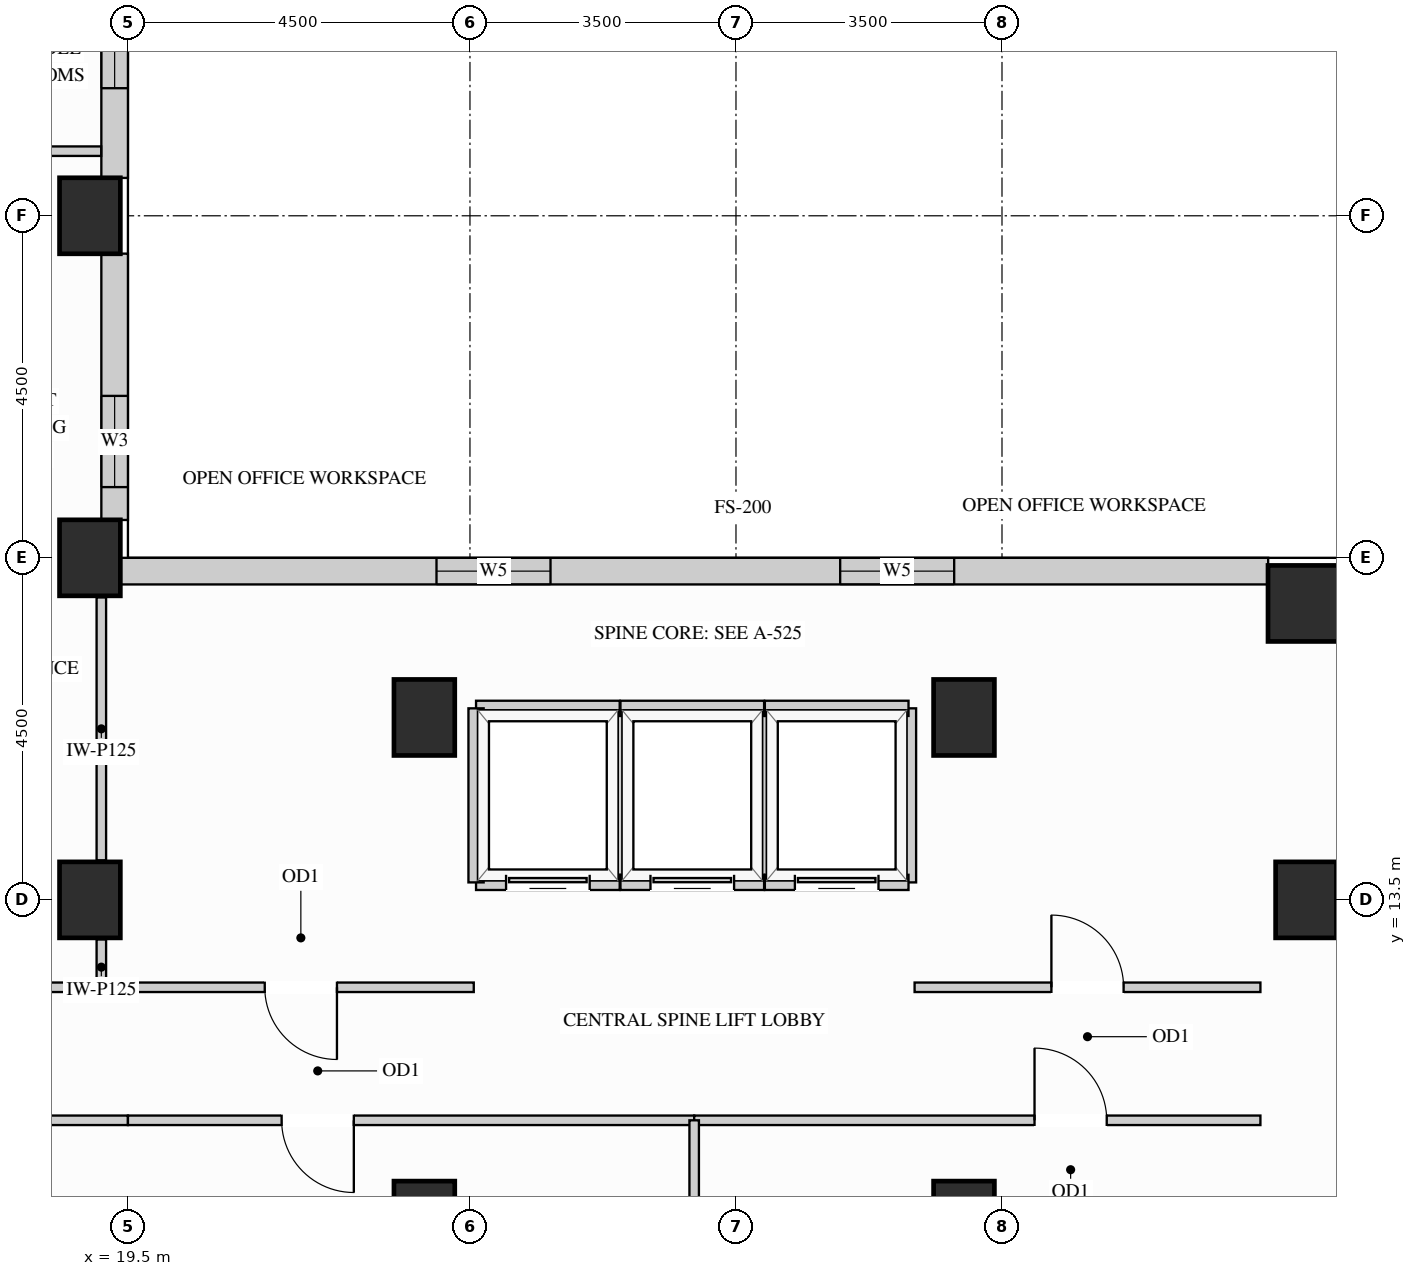
"""IFC4 building model, lengths in metres.
Left out: names, types, materials, properties, quantities, classifications, styles, units other than length and angle.
Written with IfcOpenShell. Run it as: python <this file> out.ifc"""

import sys

from ifc_helpers import new_model, si_unit, direction, frame, frame_2d, origin, origin_2d, place, context, subcontext, project, spatial, rectangle, extrude, source, transform, mapped, element, fill, save


model = new_model("IFC4")
c1 = context("Model", 3, precision=1e-05, world=origin(), true_north=direction((0.0, 1.0)))
c2 = subcontext(c1, "Body", "Model", "MODEL_VIEW")
j1 = project(units=[si_unit("LENGTHUNIT", "METRE"), si_unit("PLANEANGLEUNIT", "RADIAN")], contexts=[c1])
p1 = place(None, origin())
s1 = spatial("IfcSite", under=j1, at=p1, CompositionType="ELEMENT")
p2 = place(p1, origin())
s2 = spatial("IfcBuilding", under=s1, at=p2, CompositionType="ELEMENT")
p3 = place(p2, frame((0.0, 0.0, 171.9)))
s3 = spatial("IfcBuildingStorey", under=s2, at=p3, CompositionType="ELEMENT", Elevation=171.9)
m1 = source(origin(), c2, "Body", "SweptSolid", [
    extrude(rectangle(XDim=0.8, YDim=1.0, at=origin_2d()), origin(), (0.0, 0.0, 1.0), 3.4),
])
for number, where, z_axis, x_axis in (
    (1, (19.0, 13.5, 0.0), (0.0, 0.0, 1.0), (1.0, 0.0, 0.0)),
    (2, (19.0, 18.0, 0.0), (0.0, 0.0, 1.0), (1.0, 0.0, 0.0)),
    (3, (19.0, 22.5, 0.0), (0.0, 0.0, 1.0), (1.0, 0.0, 0.0)),
    (4, (35.0, 13.5, 0.0), (0.0, 0.0, 1.0), (1.0, 0.0, 0.0)),
    (5, (23.4, 15.9, 0.0), (0.0, 0.0, 1.0), (1.0, 0.0, 0.0)),
    (6, (23.4, 9.3, 0.0), (0.0, 0.0, 1.0), (1.0, 0.0, 0.0)),
    (7, (30.5, 15.9, 0.0), (0.0, 0.0, 1.0), (1.0, 0.0, 0.0)),
    (8, (30.5, 9.3, 0.0), (0.0, 0.0, 1.0), (1.0, 0.0, 0.0)),
):
    element("IfcColumn", number, at=place(p3, frame(where, z_axis=z_axis, x_axis=x_axis)), inside=s3, PredefinedType="COLUMN", context=c2, shape_type="MappedRepresentation", body=[
        mapped(m1, transform((0.0, 0.0, 0.0), x_axis=(1.0, 0.0, 0.0), y_axis=(0.0, 1.0, 0.0), z_axis=(0.0, 0.0, 1.0))),
    ])
m2 = source(origin(), c2, "Body", "SweptSolid", [
    extrude(rectangle(XDim=1.0, YDim=1.0, at=origin_2d()), origin(), (0.0, 0.0, 1.0), 3.4),
])
p4 = place(p3, frame((35.0, 17.4, 0.0), z_axis=(0.0, 0.0, 1.0), x_axis=(1.0, 0.0, 0.0)))
e9 = element("IfcColumn", 9, at=p4, inside=s3, PredefinedType="COLUMN", context=c2, shape_type="MappedRepresentation", body=[
    mapped(m2, transform((0.0, 0.0, 0.0), x_axis=(1.0, 0.0, 0.0), y_axis=(0.0, 1.0, 0.0), z_axis=(0.0, 0.0, 1.0))),
])
p5 = place(p3, frame((34.502, 17.825, 0.0), z_axis=(0.0, 0.0, 1.0), x_axis=(-1.0, 0.0, 0.0)))
e10 = element("IfcWall", 10, at=p5, inside=s3, PredefinedType="SOLIDWALL", context=c2, shape_type="SweptSolid", body=[
    extrude(rectangle(XDim=15.104, YDim=0.35, at=frame_2d((7.552, 0.0))), origin(), (0.0, 0.0, 1.0), 3.385),
])
p6 = place(p5, frame((4.131, 0.0, 0.78)))
e11 = element("IfcOpeningElement", 11, at=p6, cuts=e10, PredefinedType="OPENING", context=c2, shape_type="SweptSolid", body=[
    extrude(rectangle(XDim=1.5, YDim=2.0, at=frame_2d((0.75, 1.0))), frame((0.0, 0.185, 0.0), z_axis=(0.0, -1.0, 0.0), x_axis=(1.0, 0.0, 0.0)), (0.0, 0.0, 1.0), 0.37),
])
p7 = place(p5, frame((9.442, 0.0, 0.78)))
e12 = element("IfcOpeningElement", 12, at=p7, cuts=e10, PredefinedType="OPENING", context=c2, shape_type="SweptSolid", body=[
    extrude(rectangle(XDim=1.5, YDim=2.0, at=frame_2d((0.75, 1.0))), frame((0.0, 0.185, 0.0), z_axis=(0.0, -1.0, 0.0), x_axis=(1.0, 0.0, 0.0)), (0.0, 0.0, 1.0), 0.37),
])
p8 = place(p3, frame((19.325, 18.498, 0.0), z_axis=(0.0, 0.0, 1.0), x_axis=(0.0, 1.0, 0.0)))
e13 = element("IfcWall", 13, at=p8, inside=s3, PredefinedType="SOLIDWALL", context=c2, shape_type="SweptSolid", body=[
    extrude(rectangle(XDim=3.504, YDim=0.35, at=frame_2d((1.752, 0.0))), origin(), (0.0, 0.0, 1.0), 2.612),
])
p9 = place(p8, frame((0.433, 0.0, 0.78)))
e14 = element("IfcOpeningElement", 14, at=p9, cuts=e13, PredefinedType="OPENING", context=c2, shape_type="SweptSolid", body=[
    extrude(rectangle(XDim=1.2, YDim=1.652, at=frame_2d((0.6, 0.826))), frame((0.0, 0.185, 0.0), z_axis=(0.0, -1.0, 0.0), x_axis=(1.0, 0.0, 0.0)), (0.0, 0.0, 1.0), 0.37),
])
p10 = place(p3, frame((19.325, 22.998, 0.0), z_axis=(0.0, 0.0, 1.0), x_axis=(0.0, 1.0, 0.0)))
e15 = element("IfcWall", 15, at=p10, inside=s3, PredefinedType="SOLIDWALL", context=c2, shape_type="SweptSolid", body=[
    extrude(rectangle(XDim=3.304, YDim=0.35, at=frame_2d((1.652, 0.0))), origin(), (0.0, 0.0, 1.0), 2.612),
])
p11 = place(p10, frame((1.18, 0.0, 0.78)))
e16 = element("IfcOpeningElement", 16, at=p11, cuts=e15, PredefinedType="OPENING", context=c2, shape_type="SweptSolid", body=[
    extrude(rectangle(XDim=1.5, YDim=1.652, at=frame_2d((0.75, 0.826))), frame((0.0, 0.185, 0.0), z_axis=(0.0, -1.0, 0.0), x_axis=(1.0, 0.0, 0.0)), (0.0, 0.0, 1.0), 0.37),
])
m3 = source(origin(), c2, "Body", "SweptSolid", [
    extrude(rectangle(XDim=2.598, YDim=0.125, at=frame_2d((1.299, 0.0))), origin(), (0.0, 0.0, 1.0), 3.385),
])
p12 = place(p3, frame((16.55, 23.35, 0.0), z_axis=(0.0, 0.0, 1.0), x_axis=(1.0, 0.0, 0.0)))
e17 = element("IfcWall", 17, at=p12, inside=s3, PredefinedType="PARTITIONING", context=c2, shape_type="MappedRepresentation", body=[
    mapped(m3, transform((0.0, 0.0, 0.0), x_axis=(1.0, 0.0, 0.0), y_axis=(0.0, 1.0, 0.0), z_axis=(0.0, 0.0, 1.0))),
])
m4 = source(origin(), c2, "Body", "SweptSolid", [
    extrude(rectangle(XDim=0.63, YDim=0.125, at=frame_2d((0.315, 0.0))), origin(), (0.0, 0.0, 1.0), 2.773),
])
p13 = place(p3, frame((19.15, 12.35, 0.0), z_axis=(0.0, 0.0, 1.0), x_axis=(0.0, 1.0, 0.0)))
e18 = element("IfcWall", 18, at=p13, inside=s3, PredefinedType="PARTITIONING", context=c2, shape_type="MappedRepresentation", body=[
    mapped(m4, transform((0.0, 0.0, 0.0), x_axis=(1.0, 0.0, 0.0), y_axis=(0.0, 1.0, 0.0), z_axis=(0.0, 0.0, 1.0))),
])
m5 = source(origin(), c2, "Body", "SweptSolid", [
    extrude(rectangle(XDim=3.46, YDim=0.125, at=frame_2d((1.73, 0.0))), origin(), (0.0, 0.0, 1.0), 2.773),
])
p14 = place(p3, frame((19.15, 14.02, 0.0), z_axis=(0.0, 0.0, 1.0), x_axis=(0.0, 1.0, 0.0)))
e19 = element("IfcWall", 19, at=p14, inside=s3, PredefinedType="PARTITIONING", context=c2, shape_type="MappedRepresentation", body=[
    mapped(m5, transform((0.0, 0.0, 0.0), x_axis=(1.0, 0.0, 0.0), y_axis=(0.0, 1.0, 0.0), z_axis=(0.0, 0.0, 1.0))),
])
p15 = place(p3, frame((29.85, 12.35, 0.0), z_axis=(0.0, 0.0, 1.0), x_axis=(1.0, 0.0, 0.0)))
e20 = element("IfcWall", 20, at=p15, inside=s3, PredefinedType="PARTITIONING", context=c2, shape_type="SweptSolid", body=[
    extrude(rectangle(XDim=4.55, YDim=0.125, at=frame_2d((2.275, 0.0))), origin(), (0.0, 0.0, 1.0), 3.385),
])
p16 = place(p15, frame((1.8, 0.0, 0.0)))
e21 = element("IfcOpeningElement", 21, at=p16, cuts=e20, PredefinedType="OPENING", context=c2, shape_type="SweptSolid", body=[
    extrude(rectangle(XDim=0.95, YDim=2.15, at=frame_2d((0.475, 1.075))), frame((0.0, 0.073, 0.0), z_axis=(0.0, -1.0, 0.0), x_axis=(1.0, 0.0, 0.0)), (0.0, 0.0, 1.0), 0.145),
])
m6 = source(origin(), c2, "Body", "SweptSolid", [
    extrude(rectangle(XDim=2.95, YDim=0.125, at=frame_2d((1.475, 0.0))), origin(), (0.0, 0.0, 1.0), 3.385),
])
p17 = place(p3, frame((16.55, 12.35, 0.0), z_axis=(0.0, 0.0, 1.0), x_axis=(1.0, 0.0, 0.0)))
e22 = element("IfcWall", 22, at=p17, inside=s3, PredefinedType="PARTITIONING", context=c2, shape_type="MappedRepresentation", body=[
    mapped(m6, transform((0.0, 0.0, 0.0), x_axis=(1.0, 0.0, 0.0), y_axis=(0.0, 1.0, 0.0), z_axis=(0.0, 0.0, 1.0))),
])
p18 = place(p3, frame((19.5, 12.35, 0.0), z_axis=(0.0, 0.0, 1.0), x_axis=(1.0, 0.0, 0.0)))
e23 = element("IfcWall", 23, at=p18, inside=s3, PredefinedType="PARTITIONING", context=c2, shape_type="SweptSolid", body=[
    extrude(rectangle(XDim=4.55, YDim=0.125, at=frame_2d((2.275, 0.0))), origin(), (0.0, 0.0, 1.0), 3.385),
])
p19 = place(p18, frame((1.8, 0.0, 0.0)))
e24 = element("IfcOpeningElement", 24, at=p19, cuts=e23, PredefinedType="OPENING", context=c2, shape_type="SweptSolid", body=[
    extrude(rectangle(XDim=0.95, YDim=2.15, at=frame_2d((0.475, 1.075))), frame((0.0, 0.073, 0.0), z_axis=(0.0, -1.0, 0.0), x_axis=(1.0, 0.0, 0.0)), (0.0, 0.0, 1.0), 0.145),
])
p20 = place(p3, frame((16.55, 10.6, 0.0), z_axis=(0.0, 0.0, 1.0), x_axis=(1.0, 0.0, 0.0)))
e25 = element("IfcWall", 25, at=p20, inside=s3, PredefinedType="PARTITIONING", context=c2, shape_type="MappedRepresentation", body=[
    mapped(m6, transform((0.0, 0.0, 0.0), x_axis=(1.0, 0.0, 0.0), y_axis=(0.0, 1.0, 0.0), z_axis=(0.0, 0.0, 1.0))),
])
p21 = place(p3, frame((19.5, 10.6, 0.0), z_axis=(0.0, 0.0, 1.0), x_axis=(1.0, 0.0, 0.0)))
e26 = element("IfcWall", 26, at=p21, inside=s3, PredefinedType="PARTITIONING", context=c2, shape_type="SweptSolid", body=[
    extrude(rectangle(XDim=7.45, YDim=0.125, at=frame_2d((3.725, 0.0))), origin(), (0.0, 0.0, 1.0), 3.385),
])
p22 = place(p21, frame((2.022, 0.0, 0.0)))
e27 = element("IfcOpeningElement", 27, at=p22, cuts=e26, PredefinedType="OPENING", context=c2, shape_type="SweptSolid", body=[
    extrude(rectangle(XDim=0.95, YDim=2.15, at=frame_2d((0.475, 1.075))), frame((0.0, 0.073, 0.0), z_axis=(0.0, -1.0, 0.0), x_axis=(1.0, 0.0, 0.0)), (0.0, 0.0, 1.0), 0.145),
])
p23 = place(p3, frame((26.95, 10.6, 0.0), z_axis=(0.0, 0.0, 1.0), x_axis=(1.0, 0.0, 0.0)))
e28 = element("IfcWall", 28, at=p23, inside=s3, PredefinedType="PARTITIONING", context=c2, shape_type="SweptSolid", body=[
    extrude(rectangle(XDim=7.45, YDim=0.125, at=frame_2d((3.725, 0.0))), origin(), (0.0, 0.0, 1.0), 3.385),
])
p24 = place(p23, frame((4.478, 0.0, 0.0)))
e29 = element("IfcOpeningElement", 29, at=p24, cuts=e28, PredefinedType="OPENING", context=c2, shape_type="SweptSolid", body=[
    extrude(rectangle(XDim=0.95, YDim=2.15, at=frame_2d((0.475, 1.075))), frame((0.0, 0.073, 0.0), z_axis=(0.0, -1.0, 0.0), x_axis=(1.0, 0.0, 0.0)), (0.0, 0.0, 1.0), 0.145),
])
m7 = source(origin(), c2, "Body", "SweptSolid", [
    extrude(rectangle(XDim=1.748, YDim=0.125, at=frame_2d((0.874, 0.0))), origin(), (0.0, 0.0, 1.0), 3.385),
])
p25 = place(p3, frame((26.95, 8.852, 0.0), z_axis=(0.0, 0.0, 1.0), x_axis=(0.0, 1.0, 0.0)))
e30 = element("IfcWall", 30, at=p25, inside=s3, PredefinedType="PARTITIONING", context=c2, shape_type="MappedRepresentation", body=[
    mapped(m7, transform((0.0, 0.0, 0.0), x_axis=(1.0, 0.0, 0.0), y_axis=(0.0, 1.0, 0.0), z_axis=(0.0, 0.0, 1.0))),
])
m8 = source(origin(), c2, "Body", "SweptSolid", [
    extrude(rectangle(XDim=2.29, YDim=0.2, at=frame_2d((1.145, 0.0))), origin(), (0.0, 0.0, 1.0), 3.385),
])
p26 = place(p3, frame((25.97, 13.73, 0.0), z_axis=(0.0, 0.0, 1.0), x_axis=(0.0, 1.0, 0.0)))
e31 = element("IfcWall", 31, at=p26, inside=s3, PredefinedType="PARTITIONING", context=c2, shape_type="MappedRepresentation", body=[
    mapped(m8, transform((0.0, 0.0, 0.0), x_axis=(1.0, 0.0, 0.0), y_axis=(0.0, 1.0, 0.0), z_axis=(0.0, 0.0, 1.0))),
])
m9 = source(origin(), c2, "Body", "SweptSolid", [
    extrude(rectangle(XDim=1.89, YDim=0.2, at=frame_2d((0.945, 0.0))), origin(), (0.0, 0.0, 1.0), 2.773),
])
p27 = place(p3, frame((24.08, 16.02, 0.0), z_axis=(0.0, 0.0, 1.0), x_axis=(1.0, 0.0, 0.0)))
e32 = element("IfcWall", 32, at=p27, inside=s3, PredefinedType="PARTITIONING", context=c2, shape_type="MappedRepresentation", body=[
    mapped(m9, transform((0.0, 0.0, 0.0), x_axis=(1.0, 0.0, 0.0), y_axis=(0.0, 1.0, 0.0), z_axis=(0.0, 0.0, 1.0))),
])
p28 = place(p3, frame((24.08, 13.73, 0.0), z_axis=(0.0, 0.0, 1.0), x_axis=(1.0, 0.0, 0.0)))
e33 = element("IfcWall", 33, at=p28, inside=s3, PredefinedType="PARTITIONING", context=c2, shape_type="SweptSolid", body=[
    extrude(rectangle(XDim=1.89, YDim=0.2, at=frame_2d((0.945, 0.0))), origin(), (0.0, 0.0, 1.0), 2.466),
])
p29 = place(p28, frame((0.395, 0.0, 0.0)))
e34 = element("IfcOpeningElement", 34, at=p29, cuts=e33, PredefinedType="OPENING", context=c2, shape_type="SweptSolid", body=[
    extrude(rectangle(XDim=1.1, YDim=2.2, at=frame_2d((0.55, 1.1))), frame((0.0, 0.11, 0.0), z_axis=(0.0, -1.0, 0.0), x_axis=(1.0, 0.0, 0.0)), (0.0, 0.0, 1.0), 0.22),
])
for number, where, z_axis, x_axis in (
    (35, (24.08, 13.73, 0.0), (0.0, 0.0, 1.0), (0.0, 1.0, 0.0)),
    (36, (27.87, 13.73, 0.0), (0.0, 0.0, 1.0), (0.0, 1.0, 0.0)),
):
    element("IfcWall", number, at=place(p3, frame(where, z_axis=z_axis, x_axis=x_axis)), inside=s3, PredefinedType="PARTITIONING", context=c2, shape_type="MappedRepresentation", body=[
        mapped(m8, transform((0.0, 0.0, 0.0), x_axis=(1.0, 0.0, 0.0), y_axis=(0.0, 1.0, 0.0), z_axis=(0.0, 0.0, 1.0))),
    ])
m10 = source(origin(), c2, "Body", "SweptSolid", [
    extrude(rectangle(XDim=1.89, YDim=0.2, at=frame_2d((0.945, 0.0))), origin(), (0.0, 0.0, 1.0), 2.773),
])
p30 = place(p3, frame((25.98, 16.02, 0.0), z_axis=(0.0, 0.0, 1.0), x_axis=(1.0, 0.0, 0.0)))
e37 = element("IfcWall", 37, at=p30, inside=s3, PredefinedType="PARTITIONING", context=c2, shape_type="MappedRepresentation", body=[
    mapped(m10, transform((0.0, 0.0, 0.0), x_axis=(1.0, 0.0, 0.0), y_axis=(0.0, 1.0, 0.0), z_axis=(0.0, 0.0, 1.0))),
])
p31 = place(p3, frame((25.98, 13.73, 0.0), z_axis=(0.0, 0.0, 1.0), x_axis=(1.0, 0.0, 0.0)))
e38 = element("IfcWall", 38, at=p31, inside=s3, PredefinedType="PARTITIONING", context=c2, shape_type="SweptSolid", body=[
    extrude(rectangle(XDim=1.89, YDim=0.2, at=frame_2d((0.945, 0.0))), origin(), (0.0, 0.0, 1.0), 2.466),
])
p32 = place(p31, frame((0.395, 0.0, 0.0)))
e39 = element("IfcOpeningElement", 39, at=p32, cuts=e38, PredefinedType="OPENING", context=c2, shape_type="SweptSolid", body=[
    extrude(rectangle(XDim=1.1, YDim=2.2, at=frame_2d((0.55, 1.1))), frame((0.0, 0.11, 0.0), z_axis=(0.0, -1.0, 0.0), x_axis=(1.0, 0.0, 0.0)), (0.0, 0.0, 1.0), 0.22),
])
p33 = place(p3, frame((29.77, 13.73, 0.0), z_axis=(0.0, 0.0, 1.0), x_axis=(0.0, 1.0, 0.0)))
e40 = element("IfcWall", 40, at=p33, inside=s3, PredefinedType="PARTITIONING", context=c2, shape_type="MappedRepresentation", body=[
    mapped(m8, transform((0.0, 0.0, 0.0), x_axis=(1.0, 0.0, 0.0), y_axis=(0.0, 1.0, 0.0), z_axis=(0.0, 0.0, 1.0))),
])
p34 = place(p3, frame((27.88, 16.02, 0.0), z_axis=(0.0, 0.0, 1.0), x_axis=(1.0, 0.0, 0.0)))
e41 = element("IfcWall", 41, at=p34, inside=s3, PredefinedType="PARTITIONING", context=c2, shape_type="MappedRepresentation", body=[
    mapped(m10, transform((0.0, 0.0, 0.0), x_axis=(1.0, 0.0, 0.0), y_axis=(0.0, 1.0, 0.0), z_axis=(0.0, 0.0, 1.0))),
])
p35 = place(p3, frame((27.88, 13.73, 0.0), z_axis=(0.0, 0.0, 1.0), x_axis=(1.0, 0.0, 0.0)))
e42 = element("IfcWall", 42, at=p35, inside=s3, PredefinedType="PARTITIONING", context=c2, shape_type="SweptSolid", body=[
    extrude(rectangle(XDim=1.89, YDim=0.2, at=frame_2d((0.945, 0.0))), origin(), (0.0, 0.0, 1.0), 2.466),
])
p36 = place(p35, frame((0.395, 0.0, 0.0)))
e43 = element("IfcOpeningElement", 43, at=p36, cuts=e42, PredefinedType="OPENING", context=c2, shape_type="SweptSolid", body=[
    extrude(rectangle(XDim=1.1, YDim=2.2, at=frame_2d((0.55, 1.1))), frame((0.0, 0.11, 0.0), z_axis=(0.0, -1.0, 0.0), x_axis=(1.0, 0.0, 0.0)), (0.0, 0.0, 1.0), 0.22),
])
m11 = source(origin(), c2, "Body", "SweptSolid", [
    extrude(rectangle(XDim=1.1, YDim=2.2, at=frame_2d((0.55, 1.1))), frame((0.0, 0.025, 0.0), z_axis=(0.0, -1.0, 0.0), x_axis=(1.0, 0.0, 0.0)), (0.0, 0.0, 1.0), 0.05),
])
p37 = place(p29, origin())
e44 = element("IfcDoor", 44, at=p37, inside=s3, OperationType="SLIDING_TO_LEFT", PredefinedType="DOOR", context=c2, shape_type="MappedRepresentation", body=[
    mapped(m11, transform((0.0, 0.0, 0.0), x_axis=(1.0, 0.0, 0.0), y_axis=(0.0, 1.0, 0.0), z_axis=(0.0, 0.0, 1.0))),
])
fill(e34, e44)
p38 = place(p32, origin())
e45 = element("IfcDoor", 45, at=p38, inside=s3, OperationType="SLIDING_TO_LEFT", PredefinedType="DOOR", context=c2, shape_type="MappedRepresentation", body=[
    mapped(m11, transform((0.0, 0.0, 0.0), x_axis=(1.0, 0.0, 0.0), y_axis=(0.0, 1.0, 0.0), z_axis=(0.0, 0.0, 1.0))),
])
fill(e39, e45)
p39 = place(p36, origin())
e46 = element("IfcDoor", 46, at=p39, inside=s3, OperationType="SLIDING_TO_LEFT", PredefinedType="DOOR", context=c2, shape_type="MappedRepresentation", body=[
    mapped(m11, transform((0.0, 0.0, 0.0), x_axis=(1.0, 0.0, 0.0), y_axis=(0.0, 1.0, 0.0), z_axis=(0.0, 0.0, 1.0))),
])
fill(e43, e46)
m12 = source(origin(), c2, "Body", "SweptSolid", [
    extrude(rectangle(XDim=0.95, YDim=2.15, at=frame_2d((0.475, 1.075))), frame((0.0, 0.025, 0.0), z_axis=(0.0, -1.0, 0.0), x_axis=(1.0, 0.0, 0.0)), (0.0, 0.0, 1.0), 0.05),
])
p40 = place(p19, origin())
e47 = element("IfcDoor", 47, at=p40, inside=s3, OperationType="SINGLE_SWING_RIGHT", PredefinedType="DOOR", context=c2, shape_type="MappedRepresentation", body=[
    mapped(m12, transform((0.0, 0.0, 0.0), x_axis=(1.0, 0.0, 0.0), y_axis=(0.0, 1.0, 0.0), z_axis=(0.0, 0.0, 1.0))),
])
fill(e24, e47)
p41 = place(p16, origin())
e48 = element("IfcDoor", 48, at=p41, inside=s3, OperationType="SINGLE_SWING_LEFT", PredefinedType="DOOR", context=c2, shape_type="MappedRepresentation", body=[
    mapped(m12, transform((0.0, 0.0, 0.0), x_axis=(1.0, 0.0, 0.0), y_axis=(0.0, 1.0, 0.0), z_axis=(0.0, 0.0, 1.0))),
])
fill(e21, e48)
p42 = place(p22, origin())
e49 = element("IfcDoor", 49, at=p42, inside=s3, OperationType="SINGLE_SWING_RIGHT", PredefinedType="DOOR", context=c2, shape_type="MappedRepresentation", body=[
    mapped(m12, transform((0.0, 0.0, 0.0), x_axis=(1.0, 0.0, 0.0), y_axis=(0.0, 1.0, 0.0), z_axis=(0.0, 0.0, 1.0))),
])
fill(e27, e49)
p43 = place(p24, origin())
e50 = element("IfcDoor", 50, at=p43, inside=s3, OperationType="SINGLE_SWING_LEFT", PredefinedType="DOOR", context=c2, shape_type="MappedRepresentation", body=[
    mapped(m12, transform((0.0, 0.0, 0.0), x_axis=(1.0, 0.0, 0.0), y_axis=(0.0, 1.0, 0.0), z_axis=(0.0, 0.0, 1.0))),
])
fill(e29, e50)
m13 = source(origin(), c2, "Body", "SweptSolid", [
    extrude(rectangle(XDim=1.2, YDim=1.652, at=frame_2d((0.6, 0.826))), frame((0.0, 0.03, 0.0), z_axis=(0.0, -1.0, 0.0), x_axis=(1.0, 0.0, 0.0)), (0.0, 0.0, 1.0), 0.06),
])
p44 = place(p9, origin())
e51 = element("IfcWindow", 51, at=p44, inside=s3, PartitioningType="SINGLE_PANEL", PredefinedType="WINDOW", context=c2, shape_type="MappedRepresentation", body=[
    mapped(m13, transform((0.0, 0.0, 0.0), x_axis=(1.0, 0.0, 0.0), y_axis=(0.0, 1.0, 0.0), z_axis=(0.0, 0.0, 1.0))),
])
fill(e14, e51)
m14 = source(origin(), c2, "Body", "SweptSolid", [
    extrude(rectangle(XDim=1.5, YDim=2.0, at=frame_2d((0.75, 1.0))), frame((0.0, 0.03, 0.0), z_axis=(0.0, -1.0, 0.0), x_axis=(1.0, 0.0, 0.0)), (0.0, 0.0, 1.0), 0.06),
])
p45 = place(p6, origin())
e52 = element("IfcWindow", 52, at=p45, inside=s3, PartitioningType="SINGLE_PANEL", PredefinedType="WINDOW", context=c2, shape_type="MappedRepresentation", body=[
    mapped(m14, transform((0.0, 0.0, 0.0), x_axis=(1.0, 0.0, 0.0), y_axis=(0.0, 1.0, 0.0), z_axis=(0.0, 0.0, 1.0))),
])
fill(e11, e52)
p46 = place(p7, origin())
e53 = element("IfcWindow", 53, at=p46, inside=s3, PartitioningType="SINGLE_PANEL", PredefinedType="WINDOW", context=c2, shape_type="MappedRepresentation", body=[
    mapped(m14, transform((0.0, 0.0, 0.0), x_axis=(1.0, 0.0, 0.0), y_axis=(0.0, 1.0, 0.0), z_axis=(0.0, 0.0, 1.0))),
])
fill(e12, e53)
m15 = source(origin(), c2, "Body", "SweptSolid", [
    extrude(rectangle(XDim=1.5, YDim=1.652, at=frame_2d((0.75, 0.826))), frame((0.0, 0.03, 0.0), z_axis=(0.0, -1.0, 0.0), x_axis=(1.0, 0.0, 0.0)), (0.0, 0.0, 1.0), 0.06),
])
p47 = place(p11, origin())
e54 = element("IfcWindow", 54, at=p47, inside=s3, PartitioningType="SINGLE_PANEL", PredefinedType="WINDOW", context=c2, shape_type="MappedRepresentation", body=[
    mapped(m15, transform((0.0, 0.0, 0.0), x_axis=(1.0, 0.0, 0.0), y_axis=(0.0, 1.0, 0.0), z_axis=(0.0, 0.0, 1.0))),
])
fill(e16, e54)
save(model, sys.argv[1])
